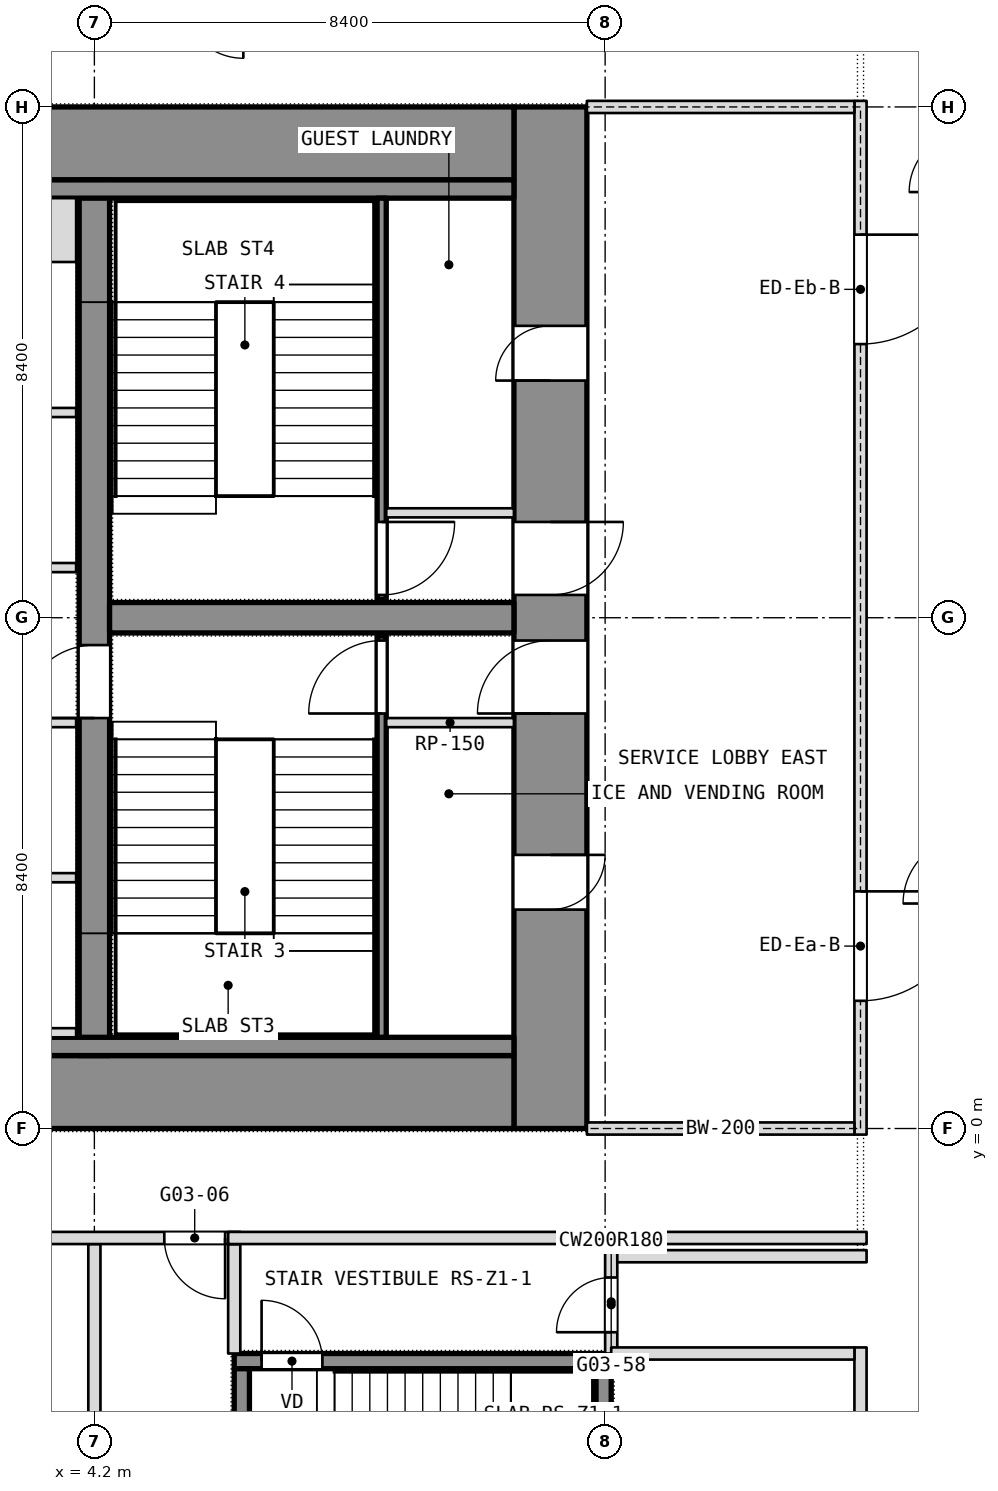
"""IFC4 building model, lengths in metres.
Left out: names, types, materials, properties, quantities, classifications, styles, units other than length and angle.
Written with IfcOpenShell. Run it as: python <this file> out.ifc"""

import sys

from ifc_helpers import new_model, si_unit, direction, frame, frame_2d, origin, place, context, subcontext, project, spatial, rectangle, extrude, element, fill, save


model = new_model("IFC4")
c1 = context("Model", 3, precision=1e-05, world=origin(), true_north=direction((0.0, 1.0)))
c2 = subcontext(c1, "Body", "Model", "MODEL_VIEW")
j1 = project(units=[si_unit("LENGTHUNIT", "METRE"), si_unit("PLANEANGLEUNIT", "RADIAN")], contexts=[c1])
p1 = place(None, origin())
s1 = spatial("IfcSite", under=j1, at=p1, CompositionType="ELEMENT")
p2 = place(p1, origin())
s2 = spatial("IfcBuilding", under=s1, at=p2, CompositionType="ELEMENT")
p3 = place(p2, frame((0.0, 0.0, 50.9)))
s3 = spatial("IfcBuildingStorey", under=s2, at=p3, CompositionType="ELEMENT", Elevation=50.9)
p4 = place(p3, frame((11.7, 0.0, 0.0), z_axis=(0.0, 0.0, 1.0), x_axis=(0.0, 1.0, 0.0)))
e1 = element("IfcWall", 1, at=p4, inside=s3, PredefinedType="SHEAR", context=c2, shape_type="SweptSolid", body=[
    extrude(rectangle(XDim=16.8, YDim=1.2, at=frame_2d((8.4, 0.0))), origin(), (0.0, 0.0, 1.0), 3.6),
])
p5 = place(p4, frame((3.6, 0.0, 0.0)))
e2 = element("IfcOpeningElement", 2, at=p5, cuts=e1, PredefinedType="OPENING", context=c2, shape_type="SweptSolid", body=[
    extrude(rectangle(XDim=0.9, YDim=2.1, at=frame_2d((0.45, 1.05))), frame((0.0, 0.6, 0.0), z_axis=(0.0, -1.0, 0.0), x_axis=(1.0, 0.0, 0.0)), (0.0, 0.0, 1.0), 1.2),
])
p6 = place(p4, frame((6.825, 0.0, 0.0)))
e3 = element("IfcOpeningElement", 3, at=p6, cuts=e1, PredefinedType="OPENING", context=c2, shape_type="SweptSolid", body=[
    extrude(rectangle(XDim=1.2, YDim=2.1, at=frame_2d((0.6, 1.05))), frame((0.0, 0.6, 0.0), z_axis=(0.0, -1.0, 0.0), x_axis=(1.0, 0.0, 0.0)), (0.0, 0.0, 1.0), 1.2),
])
p7 = place(p4, frame((12.3, 0.0, 0.0)))
e4 = element("IfcOpeningElement", 4, at=p7, cuts=e1, PredefinedType="OPENING", context=c2, shape_type="SweptSolid", body=[
    extrude(rectangle(XDim=0.9, YDim=2.1, at=frame_2d((0.45, 1.05))), frame((0.0, 0.6, 0.0), z_axis=(0.0, -1.0, 0.0), x_axis=(1.0, 0.0, 0.0)), (0.0, 0.0, 1.0), 1.2),
])
p8 = place(p4, frame((8.775, 0.0, 0.0)))
e5 = element("IfcOpeningElement", 5, at=p8, cuts=e1, PredefinedType="OPENING", context=c2, shape_type="SweptSolid", body=[
    extrude(rectangle(XDim=1.2, YDim=2.1, at=frame_2d((0.6, 1.05))), frame((0.0, 0.6, 0.0), z_axis=(0.0, -1.0, 0.0), x_axis=(1.0, 0.0, 0.0)), (0.0, 0.0, 1.0), 1.2),
])
for number, where, z_axis, x_axis in (
    (6, (-11.1, 0.6, 0.0), (0.0, 0.0, 1.0), (1.0, 0.0, 0.0)),
    (7, (-11.1, 16.2, 0.0), (0.0, 0.0, 1.0), (1.0, 0.0, 0.0)),
):
    element("IfcWall", number, at=place(p3, frame(where, z_axis=z_axis, x_axis=x_axis)), inside=s3, PredefinedType="SHEAR", context=c2, shape_type="SweptSolid", body=[
        extrude(rectangle(XDim=22.2, YDim=1.2, at=frame_2d((11.1, 0.0))), origin(), (0.0, 0.0, 1.0), 3.6),
    ])
p9 = place(p3, frame((4.2, 1.2, 0.0), z_axis=(0.0, 0.0, 1.0), x_axis=(0.0, 1.0, 0.0)))
e8 = element("IfcWall", 8, at=p9, inside=s3, PredefinedType="SHEAR", context=c2, shape_type="SweptSolid", body=[
    extrude(rectangle(XDim=14.4, YDim=0.5, at=frame_2d((7.2, 0.0))), origin(), (0.0, 0.0, 1.0), 3.6),
])
p10 = place(p9, frame((5.55, 0.0, 0.0)))
e9 = element("IfcOpeningElement", 9, at=p10, cuts=e8, PredefinedType="OPENING", context=c2, shape_type="SweptSolid", body=[
    extrude(rectangle(XDim=1.2, YDim=2.1, at=frame_2d((0.6, 1.05))), frame((0.0, 0.25, 0.0), z_axis=(0.0, -1.0, 0.0), x_axis=(1.0, 0.0, 0.0)), (0.0, 0.0, 1.0), 0.5),
])
p11 = place(p3, frame((4.45, 8.4, 0.0), z_axis=(0.0, 0.0, 1.0), x_axis=(1.0, 0.0, 0.0)))
e10 = element("IfcWall", 10, at=p11, inside=s3, PredefinedType="SHEAR", context=c2, shape_type="SweptSolid", body=[
    extrude(rectangle(XDim=6.65, YDim=0.5, at=frame_2d((3.325, 0.0))), origin(), (0.0, 0.0, 1.0), 3.6),
])
p12 = place(p3, frame((16.8, -10.9, 0.0), z_axis=(0.0, 0.0, 1.0), x_axis=(0.0, 1.0, 0.0)))
e11 = element("IfcWall", 11, at=p12, inside=s3, PredefinedType="PARTITIONING", context=c2, shape_type="SweptSolid", body=[
    extrude(rectangle(XDim=7.3, YDim=0.2, at=frame_2d((3.65, 0.0))), origin(), (0.0, 0.0, 1.0), 3.34),
])
p13 = place(p12, frame((3.15, 0.0, 0.0)))
e12 = element("IfcOpeningElement", 12, at=p13, cuts=e11, PredefinedType="OPENING", context=c2, shape_type="SweptSolid", body=[
    extrude(rectangle(XDim=1.0, YDim=2.1, at=frame_2d((0.5, 1.05))), frame((0.0, 0.1, 0.0), z_axis=(0.0, -1.0, 0.0), x_axis=(1.0, 0.0, 0.0)), (0.0, 0.0, 1.0), 0.2),
])
p14 = place(p3, frame((12.7, -3.7, 0.0), z_axis=(0.0, 0.0, 1.0), x_axis=(0.0, 1.0, 0.0)))
e13 = element("IfcWall", 13, at=p14, inside=s3, PredefinedType="PARTITIONING", context=c2, shape_type="SweptSolid", body=[
    extrude(rectangle(XDim=1.7, YDim=0.2, at=frame_2d((0.85, 0.0))), origin(), (0.0, 0.0, 1.0), 3.34),
])
p15 = place(p14, frame((0.35, 0.0, 0.0)))
e14 = element("IfcOpeningElement", 14, at=p15, cuts=e13, PredefinedType="OPENING", context=c2, shape_type="SweptSolid", body=[
    extrude(rectangle(XDim=0.9, YDim=2.1, at=frame_2d((0.45, 1.05))), frame((0.0, 0.1, 0.0), z_axis=(0.0, -1.0, 0.0), x_axis=(1.0, 0.0, 0.0)), (0.0, 0.0, 1.0), 0.2),
])
p16 = place(p3, frame((6.5, -3.7, 0.0), z_axis=(0.0, 0.0, 1.0), x_axis=(0.0, 1.0, 0.0)))
e15 = element("IfcWall", 15, at=p16, inside=s3, PredefinedType="PARTITIONING", context=c2, shape_type="SweptSolid", body=[
    extrude(rectangle(XDim=1.8, YDim=0.2, at=frame_2d((0.9, 0.0))), origin(), (0.0, 0.0, 1.0), 3.34),
])
p17 = place(p3, frame((4.2, -10.7, 0.0), z_axis=(0.0, 0.0, 1.0), x_axis=(0.0, 1.0, 0.0)))
e16 = element("IfcWall", 16, at=p17, inside=s3, PredefinedType="PARTITIONING", context=c2, shape_type="SweptSolid", body=[
    extrude(rectangle(XDim=8.8, YDim=0.2, at=frame_2d((4.4, 0.0))), origin(), (0.0, 0.0, 1.0), 3.34),
])
p18 = place(p3, frame((12.7, -3.7, 0.0), z_axis=(0.0, 0.0, 1.0), x_axis=(1.0, 0.0, 0.0)))
e17 = element("IfcWall", 17, at=p18, inside=s3, PredefinedType="PARTITIONING", context=c2, shape_type="SweptSolid", body=[
    extrude(rectangle(XDim=4.0, YDim=0.2, at=frame_2d((2.0, 0.0))), origin(), (0.0, 0.0, 1.0), 3.34),
])
p19 = place(p3, frame((12.8, -2.1, 0.0), z_axis=(0.0, 0.0, 1.0), x_axis=(1.0, 0.0, 0.0)))
e18 = element("IfcWall", 18, at=p19, inside=s3, PredefinedType="PARTITIONING", context=c2, shape_type="SweptSolid", body=[
    extrude(rectangle(XDim=4.1, YDim=0.2, at=frame_2d((2.05, 0.0))), origin(), (0.0, 0.0, 1.0), 3.34),
])
p20 = place(p3, frame((-4.3, -1.8, 0.0), z_axis=(0.0, 0.0, 1.0), x_axis=(1.0, 0.0, 0.0)))
e19 = element("IfcWall", 19, at=p20, inside=s3, PredefinedType="PARTITIONING", context=c2, shape_type="SweptSolid", body=[
    extrude(rectangle(XDim=10.9, YDim=0.2, at=frame_2d((5.45, 0.0))), origin(), (0.0, 0.0, 1.0), 3.34),
])
p21 = place(p20, frame((9.65, 0.0, 0.0)))
e20 = element("IfcOpeningElement", 20, at=p21, cuts=e19, PredefinedType="OPENING", context=c2, shape_type="SweptSolid", body=[
    extrude(rectangle(XDim=1.0, YDim=2.1, at=frame_2d((0.5, 1.05))), frame((0.0, 0.1, 0.0), z_axis=(0.0, -1.0, 0.0), x_axis=(1.0, 0.0, 0.0)), (0.0, 0.0, 1.0), 0.2),
])
p22 = place(p20, frame((3.8, 0.0, 0.0)))
e21 = element("IfcOpeningElement", 21, at=p22, cuts=e19, PredefinedType="OPENING", context=c2, shape_type="SweptSolid", body=[
    extrude(rectangle(XDim=1.0, YDim=2.1, at=frame_2d((0.5, 1.05))), frame((0.0, 0.1, 0.0), z_axis=(0.0, -1.0, 0.0), x_axis=(1.0, 0.0, 0.0)), (0.0, 0.0, 1.0), 0.2),
])
p23 = place(p3, frame((6.4, -1.8, 0.0), z_axis=(0.0, 0.0, 1.0), x_axis=(1.0, 0.0, 0.0)))
e22 = element("IfcWall", 22, at=p23, inside=s3, PredefinedType="PARTITIONING", context=c2, shape_type="SweptSolid", body=[
    extrude(rectangle(XDim=10.5, YDim=0.2, at=frame_2d((5.25, 0.0))), origin(), (0.0, 0.0, 1.0), 3.34),
])
for number, where, z_axis, x_axis in (
    (23, (-11.1, 1.35, 0.0), (0.0, 0.0, 1.0), (1.0, 0.0, 0.0)),
    (24, (-11.1, 15.45, 0.0), (0.0, 0.0, 1.0), (1.0, 0.0, 0.0)),
):
    element("IfcWall", number, at=place(p3, frame(where, z_axis=z_axis, x_axis=x_axis)), inside=s3, PredefinedType="PARTITIONING", context=c2, shape_type="SweptSolid", body=[
        extrude(rectangle(XDim=22.2, YDim=0.3, at=frame_2d((11.1, 0.0))), origin(), (0.0, 0.0, 1.0), 3.34),
    ])
p24 = place(p3, frame((8.925, 1.5, 0.0), z_axis=(0.0, 0.0, 1.0), x_axis=(0.0, 1.0, 0.0)))
e25 = element("IfcWall", 25, at=p24, inside=s3, PredefinedType="SHEAR", context=c2, shape_type="SweptSolid", body=[
    extrude(rectangle(XDim=6.6, YDim=0.15, at=frame_2d((3.3, 0.0))), origin(), (0.0, 0.0, 1.0), 3.34),
])
p25 = place(p24, frame((5.325, 0.0, 0.0)))
e26 = element("IfcOpeningElement", 26, at=p25, cuts=e25, PredefinedType="OPENING", context=c2, shape_type="SweptSolid", body=[
    extrude(rectangle(XDim=1.2, YDim=2.1, at=frame_2d((0.6, 1.05))), frame((0.0, 0.075, 0.0), z_axis=(0.0, -1.0, 0.0), x_axis=(1.0, 0.0, 0.0)), (0.0, 0.0, 1.0), 0.15),
])
p26 = place(p3, frame((9.0, 6.675, 0.0), z_axis=(0.0, 0.0, 1.0), x_axis=(1.0, 0.0, 0.0)))
e27 = element("IfcWall", 27, at=p26, inside=s3, PredefinedType="PARTITIONING", context=c2, shape_type="SweptSolid", body=[
    extrude(rectangle(XDim=2.1, YDim=0.15, at=frame_2d((1.05, 0.0))), origin(), (0.0, 0.0, 1.0), 3.34),
])
p27 = place(p3, frame((8.925, 8.7, 0.0), z_axis=(0.0, 0.0, 1.0), x_axis=(0.0, 1.0, 0.0)))
e28 = element("IfcWall", 28, at=p27, inside=s3, PredefinedType="SHEAR", context=c2, shape_type="SweptSolid", body=[
    extrude(rectangle(XDim=6.6, YDim=0.15, at=frame_2d((3.3, 0.0))), origin(), (0.0, 0.0, 1.0), 3.34),
])
p28 = place(p27, frame((0.075, 0.0, 0.0)))
e29 = element("IfcOpeningElement", 29, at=p28, cuts=e28, PredefinedType="OPENING", context=c2, shape_type="SweptSolid", body=[
    extrude(rectangle(XDim=1.2, YDim=2.1, at=frame_2d((0.6, 1.05))), frame((0.0, 0.075, 0.0), z_axis=(0.0, -1.0, 0.0), x_axis=(1.0, 0.0, 0.0)), (0.0, 0.0, 1.0), 0.15),
])
p29 = place(p3, frame((9.0, 10.125, 0.0), z_axis=(0.0, 0.0, 1.0), x_axis=(1.0, 0.0, 0.0)))
e30 = element("IfcWall", 30, at=p29, inside=s3, PredefinedType="PARTITIONING", context=c2, shape_type="SweptSolid", body=[
    extrude(rectangle(XDim=2.1, YDim=0.15, at=frame_2d((1.05, 0.0))), origin(), (0.0, 0.0, 1.0), 3.34),
])
p30 = place(p3, frame((-3.9, 4.125, 0.0), z_axis=(0.0, 0.0, 1.0), x_axis=(1.0, 0.0, 0.0)))
e31 = element("IfcWall", 31, at=p30, inside=s3, PredefinedType="PARTITIONING", context=c2, shape_type="SweptSolid", body=[
    extrude(rectangle(XDim=7.8, YDim=0.15, at=frame_2d((3.9, 0.0))), origin(), (0.0, 0.0, 1.0), 3.34),
])
p31 = place(p30, frame((3.75, 0.0, 0.0)))
e32 = element("IfcOpeningElement", 32, at=p31, cuts=e31, PredefinedType="OPENING", context=c2, shape_type="SweptSolid", body=[
    extrude(rectangle(XDim=1.2, YDim=2.1, at=frame_2d((0.6, 1.05))), frame((0.0, 0.075, 0.0), z_axis=(0.0, -1.0, 0.0), x_axis=(1.0, 0.0, 0.0)), (0.0, 0.0, 1.0), 0.15),
])
p32 = place(p3, frame((-3.9, 11.775, 0.0), z_axis=(0.0, 0.0, 1.0), x_axis=(1.0, 0.0, 0.0)))
e33 = element("IfcWall", 33, at=p32, inside=s3, PredefinedType="PARTITIONING", context=c2, shape_type="SweptSolid", body=[
    extrude(rectangle(XDim=7.8, YDim=0.15, at=frame_2d((3.9, 0.0))), origin(), (0.0, 0.0, 1.0), 3.34),
])
p33 = place(p32, frame((3.3, 0.0, 0.0)))
e34 = element("IfcOpeningElement", 34, at=p33, cuts=e33, PredefinedType="OPENING", context=c2, shape_type="SweptSolid", body=[
    extrude(rectangle(XDim=1.2, YDim=2.1, at=frame_2d((0.6, 1.05))), frame((0.0, 0.075, 0.0), z_axis=(0.0, -1.0, 0.0), x_axis=(1.0, 0.0, 0.0)), (0.0, 0.0, 1.0), 0.15),
])
p34 = place(p3, frame((1.65, 1.575, 0.0), z_axis=(0.0, 0.0, 1.0), x_axis=(1.0, 0.0, 0.0)))
e35 = element("IfcWall", 35, at=p34, inside=s3, PredefinedType="SHEAR", context=c2, shape_type="SweptSolid", body=[
    extrude(rectangle(XDim=2.25, YDim=0.15, at=frame_2d((1.125, 0.0))), origin(), (0.0, 0.0, 1.0), 3.6),
])
p35 = place(p3, frame((1.65, 14.775, 0.0), z_axis=(0.0, 0.0, 1.0), x_axis=(1.0, 0.0, 0.0)))
e36 = element("IfcWall", 36, at=p35, inside=s3, PredefinedType="SHEAR", context=c2, shape_type="SweptSolid", body=[
    extrude(rectangle(XDim=2.25, YDim=1.05, at=frame_2d((1.125, 0.0))), origin(), (0.0, 0.0, 1.0), 3.6),
])
for number, where, z_axis, x_axis in (
    (37, (1.65, 6.675, 0.0), (0.0, 0.0, 1.0), (1.0, 0.0, 0.0)),
    (38, (1.65, 9.225, 0.0), (0.0, 0.0, 1.0), (1.0, 0.0, 0.0)),
):
    element("IfcWall", number, at=place(p3, frame(where, z_axis=z_axis, x_axis=x_axis)), inside=s3, PredefinedType="SHEAR", context=c2, shape_type="SweptSolid", body=[
        extrude(rectangle(XDim=2.25, YDim=0.15, at=frame_2d((1.125, 0.0))), origin(), (0.0, 0.0, 1.0), 3.6),
    ])
p36 = place(p3, frame((16.8, -0.1, 0.0), z_axis=(0.0, 0.0, 1.0), x_axis=(0.0, 1.0, 0.0)))
e39 = element("IfcWall", 39, at=p36, inside=s3, PredefinedType="PARTITIONING", context=c2, shape_type="SweptSolid", body=[
    extrude(rectangle(XDim=17.0, YDim=0.2, at=frame_2d((8.5, 0.0))), origin(), (0.0, 0.0, 1.0), 3.34),
])
p37 = place(p36, frame((2.2, 0.0, 0.0)))
e40 = element("IfcOpeningElement", 40, at=p37, cuts=e39, PredefinedType="OPENING", context=c2, shape_type="SweptSolid", body=[
    extrude(rectangle(XDim=1.8, YDim=2.1, at=frame_2d((0.9, 1.05))), frame((0.0, 0.1, 0.0), z_axis=(0.0, -1.0, 0.0), x_axis=(1.0, 0.0, 0.0)), (0.0, 0.0, 1.0), 0.2),
])
p38 = place(p36, frame((13.0, 0.0, 0.0)))
e41 = element("IfcOpeningElement", 41, at=p38, cuts=e39, PredefinedType="OPENING", context=c2, shape_type="SweptSolid", body=[
    extrude(rectangle(XDim=1.8, YDim=2.1, at=frame_2d((0.9, 1.05))), frame((0.0, 0.1, 0.0), z_axis=(0.0, -1.0, 0.0), x_axis=(1.0, 0.0, 0.0)), (0.0, 0.0, 1.0), 0.2),
])
for number, where, z_axis, x_axis in (
    (42, (12.3, 0.0, 0.0), (0.0, 0.0, 1.0), (1.0, 0.0, 0.0)),
    (43, (12.3, 16.8, 0.0), (0.0, 0.0, 1.0), (1.0, 0.0, 0.0)),
):
    element("IfcWall", number, at=place(p3, frame(where, z_axis=z_axis, x_axis=x_axis)), inside=s3, PredefinedType="PARTITIONING", context=c2, shape_type="SweptSolid", body=[
        extrude(rectangle(XDim=4.4, YDim=0.2, at=frame_2d((2.2, 0.0))), origin(), (0.0, 0.0, 1.0), 2.84),
    ])
p39 = place(p3, frame((6.5, -3.825, 0.1), z_axis=(0.0, 0.0, 1.0), x_axis=(1.0, 0.0, 0.0)))
e44 = element("IfcWall", 44, at=p39, inside=s3, PredefinedType="SHEAR", context=c2, shape_type="SweptSolid", body=[
    extrude(rectangle(XDim=6.2, YDim=0.25, at=frame_2d((3.1, 0.0))), origin(), (0.0, 0.0, 1.0), 3.6),
])
p40 = place(p39, frame((0.45, 0.0, 0.0)))
e45 = element("IfcOpeningElement", 45, at=p40, cuts=e44, PredefinedType="OPENING", context=c2, shape_type="SweptSolid", body=[
    extrude(rectangle(XDim=1.0, YDim=2.1, at=frame_2d((0.5, 1.05))), frame((0.0, 0.125, 0.0), z_axis=(0.0, -1.0, 0.0), x_axis=(1.0, 0.0, 0.0)), (0.0, 0.0, 1.0), 0.25),
])
for number, where, z_axis, x_axis in (
    (46, (6.625, -6.85, 0.1), (0.0, 0.0, 1.0), (0.0, 1.0, 0.0)),
    (47, (12.575, -6.85, 0.1), (0.0, 0.0, 1.0), (0.0, 1.0, 0.0)),
):
    element("IfcWall", number, at=place(p3, frame(where, z_axis=z_axis, x_axis=x_axis)), inside=s3, PredefinedType="SHEAR", context=c2, shape_type="SweptSolid", body=[
        extrude(rectangle(XDim=2.9, YDim=0.25, at=frame_2d((1.45, 0.0))), origin(), (0.0, 0.0, 1.0), 3.6),
    ])
p41 = place(p15, origin())
e48 = element("IfcDoor", 48, at=p41, inside=s3, OperationType="SINGLE_SWING_LEFT", PredefinedType="DOOR", context=c2, shape_type="SweptSolid", body=[
    extrude(rectangle(XDim=0.9, YDim=2.1, at=frame_2d((0.45, 1.05))), frame((0.0, 0.025, 0.0), z_axis=(0.0, -1.0, 0.0), x_axis=(1.0, 0.0, 0.0)), (0.0, 0.0, 1.0), 0.05),
])
fill(e14, e48)
p42 = place(p21, origin())
e49 = element("IfcDoor", 49, at=p42, inside=s3, OperationType="SINGLE_SWING_LEFT", PredefinedType="DOOR", context=c2, shape_type="SweptSolid", body=[
    extrude(rectangle(XDim=1.0, YDim=2.1, at=frame_2d((0.5, 1.05))), frame((0.0, 0.025, 0.0), z_axis=(0.0, -1.0, 0.0), x_axis=(1.0, 0.0, 0.0)), (0.0, 0.0, 1.0), 0.05),
])
fill(e20, e49)
p43 = place(p40, origin())
e50 = element("IfcDoor", 50, at=p43, inside=s3, OperationType="SINGLE_SWING_LEFT", PredefinedType="DOOR", context=c2, shape_type="SweptSolid", body=[
    extrude(rectangle(XDim=1.0, YDim=2.1, at=frame_2d((0.5, 1.05))), frame((0.0, 0.025, 0.0), z_axis=(0.0, -1.0, 0.0), x_axis=(1.0, 0.0, 0.0)), (0.0, 0.0, 1.0), 0.05),
])
fill(e45, e50)
p44 = place(p5, origin())
e51 = element("IfcDoor", 51, at=p44, inside=s3, OperationType="SINGLE_SWING_LEFT", PredefinedType="DOOR", context=c2, shape_type="SweptSolid", body=[
    extrude(rectangle(XDim=0.9, YDim=2.1, at=frame_2d((0.45, 1.05))), frame((0.0, 0.025, 0.0), z_axis=(0.0, -1.0, 0.0), x_axis=(1.0, 0.0, 0.0)), (0.0, 0.0, 1.0), 0.05),
])
fill(e2, e51)
p45 = place(p6, origin())
e52 = element("IfcDoor", 52, at=p45, inside=s3, OperationType="SINGLE_SWING_LEFT", PredefinedType="DOOR", context=c2, shape_type="SweptSolid", body=[
    extrude(rectangle(XDim=1.2, YDim=2.1, at=frame_2d((0.6, 1.05))), frame((0.0, 0.025, 0.0), z_axis=(0.0, -1.0, 0.0), x_axis=(1.0, 0.0, 0.0)), (0.0, 0.0, 1.0), 0.05),
])
fill(e3, e52)
p46 = place(p25, origin())
e53 = element("IfcDoor", 53, at=p46, inside=s3, OperationType="SINGLE_SWING_LEFT", PredefinedType="DOOR", context=c2, shape_type="SweptSolid", body=[
    extrude(rectangle(XDim=1.2, YDim=2.1, at=frame_2d((0.6, 1.05))), frame((0.0, 0.025, 0.0), z_axis=(0.0, -1.0, 0.0), x_axis=(1.0, 0.0, 0.0)), (0.0, 0.0, 1.0), 0.05),
])
fill(e26, e53)
p47 = place(p7, origin())
e54 = element("IfcDoor", 54, at=p47, inside=s3, OperationType="SINGLE_SWING_LEFT", PredefinedType="DOOR", context=c2, shape_type="SweptSolid", body=[
    extrude(rectangle(XDim=0.9, YDim=2.1, at=frame_2d((0.45, 1.05))), frame((0.0, 0.025, 0.0), z_axis=(0.0, -1.0, 0.0), x_axis=(1.0, 0.0, 0.0)), (0.0, 0.0, 1.0), 0.05),
])
fill(e4, e54)
p48 = place(p8, origin())
e55 = element("IfcDoor", 55, at=p48, inside=s3, OperationType="SINGLE_SWING_LEFT", PredefinedType="DOOR", context=c2, shape_type="SweptSolid", body=[
    extrude(rectangle(XDim=1.2, YDim=2.1, at=frame_2d((0.6, 1.05))), frame((0.0, 0.025, 0.0), z_axis=(0.0, -1.0, 0.0), x_axis=(1.0, 0.0, 0.0)), (0.0, 0.0, 1.0), 0.05),
])
fill(e5, e55)
p49 = place(p28, origin())
e56 = element("IfcDoor", 56, at=p49, inside=s3, OperationType="SINGLE_SWING_LEFT", PredefinedType="DOOR", context=c2, shape_type="SweptSolid", body=[
    extrude(rectangle(XDim=1.2, YDim=2.1, at=frame_2d((0.6, 1.05))), frame((0.0, 0.025, 0.0), z_axis=(0.0, -1.0, 0.0), x_axis=(1.0, 0.0, 0.0)), (0.0, 0.0, 1.0), 0.05),
])
fill(e29, e56)
p50 = place(p10, origin())
e57 = element("IfcDoor", 57, at=p50, inside=s3, OperationType="SINGLE_SWING_LEFT", PredefinedType="DOOR", context=c2, shape_type="SweptSolid", body=[
    extrude(rectangle(XDim=1.2, YDim=2.1, at=frame_2d((0.6, 1.05))), frame((0.0, 0.025, 0.0), z_axis=(0.0, -1.0, 0.0), x_axis=(1.0, 0.0, 0.0)), (0.0, 0.0, 1.0), 0.05),
])
fill(e9, e57)
p51 = place(p37, origin())
e58 = element("IfcDoor", 58, at=p51, inside=s3, OperationType="DOUBLE_DOOR_SINGLE_SWING", PredefinedType="DOOR", context=c2, shape_type="SweptSolid", body=[
    extrude(rectangle(XDim=1.8, YDim=2.1, at=frame_2d((0.9, 1.05))), frame((0.0, 0.025, 0.0), z_axis=(0.0, -1.0, 0.0), x_axis=(1.0, 0.0, 0.0)), (0.0, 0.0, 1.0), 0.05),
])
fill(e40, e58)
p52 = place(p38, origin())
e59 = element("IfcDoor", 59, at=p52, inside=s3, OperationType="DOUBLE_DOOR_SINGLE_SWING", PredefinedType="DOOR", context=c2, shape_type="SweptSolid", body=[
    extrude(rectangle(XDim=1.8, YDim=2.1, at=frame_2d((0.9, 1.05))), frame((0.0, 0.025, 0.0), z_axis=(0.0, -1.0, 0.0), x_axis=(1.0, 0.0, 0.0)), (0.0, 0.0, 1.0), 0.05),
])
fill(e41, e59)
save(model, sys.argv[1])
